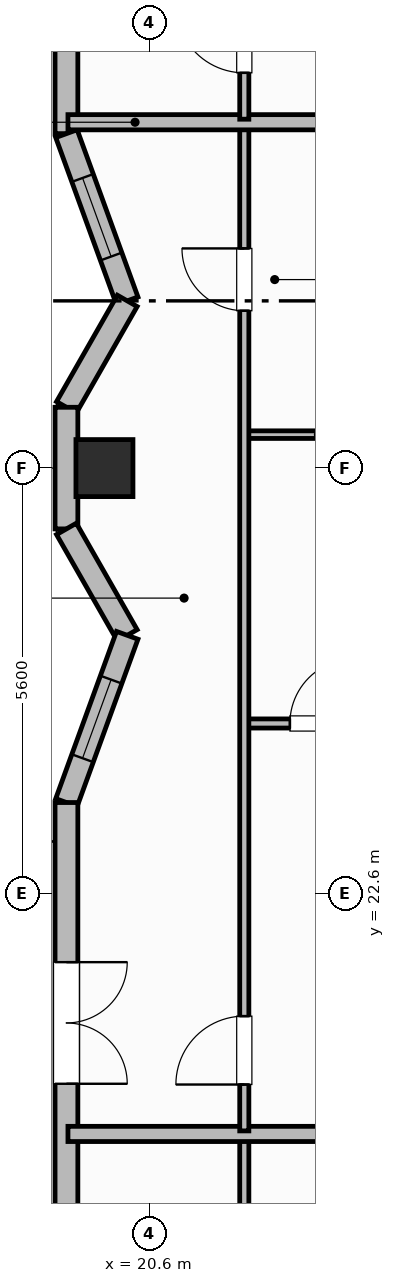
"""IFC4 building model, lengths in metres.
Left out: names, types, materials, properties, quantities, classifications, styles, units other than length and angle.
Written with IfcOpenShell. Run it as: python <this file> out.ifc"""

import sys

from ifc_helpers import new_model, si_unit, direction, frame, frame_2d, origin, origin_2d, place, context, subcontext, project, spatial, rectangle, extrude, element, fill, save


model = new_model("IFC4")
c1 = context("Model", 3, precision=1e-05, world=origin(), true_north=direction((0.0, 1.0)))
c2 = subcontext(c1, "Body", "Model", "MODEL_VIEW")
j1 = project(units=[si_unit("LENGTHUNIT", "METRE"), si_unit("PLANEANGLEUNIT", "RADIAN")], contexts=[c1])
p1 = place(None, origin())
s1 = spatial("IfcSite", under=j1, at=p1, CompositionType="ELEMENT")
p2 = place(p1, origin())
s2 = spatial("IfcBuilding", under=s1, at=p2, CompositionType="ELEMENT")
p3 = place(p2, frame((0.0, 0.0, 267.6)))
s3 = spatial("IfcBuildingStorey", under=s2, at=p3, CompositionType="ELEMENT", Elevation=267.6)
p4 = place(p3, frame((20.01, 28.2, 0.0), z_axis=(0.0, 0.0, 1.0), x_axis=(1.0, 0.0, 0.0)))
e1 = element("IfcColumn", 1, at=p4, inside=s3, PredefinedType="COLUMN", context=c2, shape_type="SweptSolid", body=[
    extrude(rectangle(XDim=0.75, YDim=0.75, at=origin_2d()), origin(), (0.0, 0.0, 1.0), 3.7),
])
p5 = place(p3, frame((19.51, 43.72, 0.0), z_axis=(0.0, 0.0, 1.0), x_axis=(0.0, -1.0, 0.0)))
e2 = element("IfcWall", 2, at=p5, inside=s3, PredefinedType="SOLIDWALL", context=c2, shape_type="SweptSolid", body=[
    extrude(rectangle(XDim=11.12, YDim=0.3, at=frame_2d((5.56, 0.0))), origin(), (0.0, 0.0, 1.0), 2.73),
])
p6 = place(p5, frame((1.137, 0.0, 0.71)))
e3 = element("IfcOpeningElement", 3, at=p6, cuts=e2, PredefinedType="OPENING", context=c2, shape_type="SweptSolid", body=[
    extrude(rectangle(XDim=1.6, YDim=1.9, at=frame_2d((0.8, 0.95))), frame((0.0, 0.16, 0.0), z_axis=(0.0, -1.0, 0.0), x_axis=(1.0, 0.0, 0.0)), (0.0, 0.0, 1.0), 0.32),
])
p7 = place(p5, frame((8.033, 0.0, 0.71)))
e4 = element("IfcOpeningElement", 4, at=p7, cuts=e2, PredefinedType="OPENING", context=c2, shape_type="SweptSolid", body=[
    extrude(rectangle(XDim=1.6, YDim=1.9, at=frame_2d((0.8, 0.95))), frame((0.0, 0.16, 0.0), z_axis=(0.0, -1.0, 0.0), x_axis=(1.0, 0.0, 0.0)), (0.0, 0.0, 1.0), 0.32),
])
p8 = place(p3, frame((19.51, 32.6, 0.0), z_axis=(0.0, 0.0, 1.0), x_axis=(0.341734690003, -0.939796468204, 0.0)))
e5 = element("IfcWall", 5, at=p8, inside=s3, PredefinedType="SOLIDWALL", context=c2, shape_type="SweptSolid", body=[
    extrude(rectangle(XDim=2.341, YDim=0.3, at=frame_2d((1.17, 0.0))), origin(), (0.0, 0.0, 1.0), 2.73),
])
p9 = place(p8, frame((0.621, 0.0, 0.92)))
e6 = element("IfcOpeningElement", 6, at=p9, cuts=e5, PredefinedType="OPENING", context=c2, shape_type="SweptSolid", body=[
    extrude(rectangle(XDim=1.1, YDim=1.65, at=frame_2d((0.55, 0.825))), frame((0.0, 0.16, 0.0), z_axis=(0.0, -1.0, 0.0), x_axis=(1.0, 0.0, 0.0)), (0.0, 0.0, 1.0), 0.32),
])
p10 = place(p3, frame((20.31, 30.4, 0.0), z_axis=(0.0, 0.0, 1.0), x_axis=(-0.496187856351, -0.868215187157, 0.0)))
e7 = element("IfcWall", 7, at=p10, inside=s3, PredefinedType="SOLIDWALL", context=c2, shape_type="SweptSolid", body=[
    extrude(rectangle(XDim=1.612, YDim=0.3, at=frame_2d((0.806, 0.0))), origin(), (0.0, 0.0, 1.0), 2.73),
])
p11 = place(p3, frame((19.51, 29.0, 0.0), z_axis=(0.0, 0.0, 1.0), x_axis=(0.0, -1.0, 0.0)))
e8 = element("IfcWall", 8, at=p11, inside=s3, PredefinedType="SOLIDWALL", context=c2, shape_type="SweptSolid", body=[
    extrude(rectangle(XDim=1.6, YDim=0.3, at=frame_2d((0.8, 0.0))), origin(), (0.0, 0.0, 1.0), 2.73),
])
p12 = place(p3, frame((19.51, 27.4, 0.0), z_axis=(0.0, 0.0, 1.0), x_axis=(0.496187856351, -0.868215187157, 0.0)))
e9 = element("IfcWall", 9, at=p12, inside=s3, PredefinedType="SOLIDWALL", context=c2, shape_type="SweptSolid", body=[
    extrude(rectangle(XDim=1.612, YDim=0.3, at=frame_2d((0.806, 0.0))), origin(), (0.0, 0.0, 1.0), 2.73),
])
p13 = place(p3, frame((20.31, 26.0, 0.0), z_axis=(0.0, 0.0, 1.0), x_axis=(-0.341768184638, -0.939784287999, 0.0)))
e10 = element("IfcWall", 10, at=p13, inside=s3, PredefinedType="SOLIDWALL", context=c2, shape_type="SweptSolid", body=[
    extrude(rectangle(XDim=2.341, YDim=0.3, at=frame_2d((1.17, 0.0))), origin(), (0.0, 0.0, 1.0), 2.73),
])
p14 = place(p13, frame((0.621, 0.0, 0.92)))
e11 = element("IfcOpeningElement", 11, at=p14, cuts=e10, PredefinedType="OPENING", context=c2, shape_type="SweptSolid", body=[
    extrude(rectangle(XDim=1.1, YDim=1.65, at=frame_2d((0.55, 0.825))), frame((0.0, 0.16, 0.0), z_axis=(0.0, -1.0, 0.0), x_axis=(1.0, 0.0, 0.0)), (0.0, 0.0, 1.0), 0.32),
])
p15 = place(p3, frame((19.51, 23.8, 0.0), z_axis=(0.0, 0.0, 1.0), x_axis=(0.0, -1.0, 0.0)))
e12 = element("IfcWall", 12, at=p15, inside=s3, PredefinedType="SOLIDWALL", context=c2, shape_type="SweptSolid", body=[
    extrude(rectangle(XDim=11.12, YDim=0.3, at=frame_2d((5.56, 0.0))), origin(), (0.0, 0.0, 1.0), 2.73),
])
p16 = place(p15, frame((2.1, 0.0, 0.0)))
e13 = element("IfcOpeningElement", 13, at=p16, cuts=e12, PredefinedType="OPENING", context=c2, shape_type="SweptSolid", body=[
    extrude(rectangle(XDim=1.6, YDim=2.1, at=frame_2d((0.8, 1.05))), frame((0.0, 0.16, 0.0), z_axis=(0.0, -1.0, 0.0), x_axis=(1.0, 0.0, 0.0)), (0.0, 0.0, 1.0), 0.32),
])
p17 = place(p15, frame((8.483, 0.0, 0.76)))
e14 = element("IfcOpeningElement", 14, at=p17, cuts=e12, PredefinedType="OPENING", context=c2, shape_type="SweptSolid", body=[
    extrude(rectangle(XDim=1.4, YDim=1.85, at=frame_2d((0.7, 0.925))), frame((0.0, 0.16, 0.0), z_axis=(0.0, -1.0, 0.0), x_axis=(1.0, 0.0, 0.0)), (0.0, 0.0, 1.0), 0.32),
])
p18 = place(p3, frame((21.85, 9.99, 0.0), z_axis=(0.0, 0.0, 1.0), x_axis=(0.0, 1.0, 0.0)))
e15 = element("IfcWall", 15, at=p18, inside=s3, PredefinedType="PARTITIONING", context=c2, shape_type="SweptSolid", body=[
    extrude(rectangle(XDim=9.41, YDim=0.12, at=frame_2d((4.705, 0.0))), origin(), (0.0, 0.0, 1.0), 2.56),
])
p19 = place(p18, frame((0.41, 0.0, 0.0)))
e16 = element("IfcOpeningElement", 16, at=p19, cuts=e15, PredefinedType="OPENING", context=c2, shape_type="SweptSolid", body=[
    extrude(rectangle(XDim=0.9, YDim=2.1, at=frame_2d((0.45, 1.05))), frame((0.0, 0.07, 0.0), z_axis=(0.0, -1.0, 0.0), x_axis=(1.0, 0.0, 0.0)), (0.0, 0.0, 1.0), 0.14),
])
p20 = place(p3, frame((19.53, 19.44, 0.0), z_axis=(0.0, 0.0, 1.0), x_axis=(1.0, 0.0, 0.0)))
e17 = element("IfcWall", 17, at=p20, inside=s3, PredefinedType="PARTITIONING", context=c2, shape_type="SweptSolid", body=[
    extrude(rectangle(XDim=4.27, YDim=0.2, at=frame_2d((2.135, 0.0))), origin(), (0.0, 0.0, 1.0), 2.56),
])
p21 = place(p3, frame((21.85, 24.84, 0.0), z_axis=(0.0, 0.0, 1.0), x_axis=(1.0, 0.0, 0.0)))
e18 = element("IfcWall", 18, at=p21, inside=s3, PredefinedType="PARTITIONING", context=c2, shape_type="SweptSolid", body=[
    extrude(rectangle(XDim=1.95, YDim=0.12, at=frame_2d((0.975, 0.0))), origin(), (0.0, 0.0, 1.0), 2.56),
])
p22 = place(p21, frame((0.6, 0.0, 0.0)))
e19 = element("IfcOpeningElement", 19, at=p22, cuts=e18, PredefinedType="OPENING", context=c2, shape_type="SweptSolid", body=[
    extrude(rectangle(XDim=0.85, YDim=2.1, at=frame_2d((0.425, 1.05))), frame((0.0, 0.07, 0.0), z_axis=(0.0, -1.0, 0.0), x_axis=(1.0, 0.0, 0.0)), (0.0, 0.0, 1.0), 0.14),
])
p23 = place(p3, frame((21.85, 28.64, 0.0), z_axis=(0.0, 0.0, 1.0), x_axis=(1.0, 0.0, 0.0)))
e20 = element("IfcWall", 20, at=p23, inside=s3, PredefinedType="PARTITIONING", context=c2, shape_type="SweptSolid", body=[
    extrude(rectangle(XDim=1.95, YDim=0.1, at=frame_2d((0.975, 0.0))), origin(), (0.0, 0.0, 1.0), 2.56),
])
p24 = place(p3, frame((21.85, 19.48, 0.0), z_axis=(0.0, 0.0, 1.0), x_axis=(0.0, 1.0, 0.0)))
e21 = element("IfcWall", 21, at=p24, inside=s3, PredefinedType="PARTITIONING", context=c2, shape_type="SweptSolid", body=[
    extrude(rectangle(XDim=13.23, YDim=0.12, at=frame_2d((6.615, 0.0))), origin(), (0.0, 0.0, 1.0), 2.56),
])
p25 = place(p24, frame((0.61, 0.0, 0.0)))
e22 = element("IfcOpeningElement", 22, at=p25, cuts=e21, PredefinedType="OPENING", context=c2, shape_type="SweptSolid", body=[
    extrude(rectangle(XDim=0.9, YDim=2.1, at=frame_2d((0.45, 1.05))), frame((0.0, 0.07, 0.0), z_axis=(0.0, -1.0, 0.0), x_axis=(1.0, 0.0, 0.0)), (0.0, 0.0, 1.0), 0.14),
])
p26 = place(p24, frame((10.79, 0.0, 0.0)))
e23 = element("IfcOpeningElement", 23, at=p26, cuts=e21, PredefinedType="OPENING", context=c2, shape_type="SweptSolid", body=[
    extrude(rectangle(XDim=0.82, YDim=2.08, at=frame_2d((0.41, 1.04))), frame((0.0, 0.07, 0.0), z_axis=(0.0, -1.0, 0.0), x_axis=(1.0, 0.0, 0.0)), (0.0, 0.0, 1.0), 0.14),
])
p27 = place(p3, frame((19.53, 32.75, 0.0), z_axis=(0.0, 0.0, 1.0), x_axis=(1.0, 0.0, 0.0)))
e24 = element("IfcWall", 24, at=p27, inside=s3, PredefinedType="PARTITIONING", context=c2, shape_type="SweptSolid", body=[
    extrude(rectangle(XDim=4.27, YDim=0.2, at=frame_2d((2.135, 0.0))), origin(), (0.0, 0.0, 1.0), 2.56),
])
p28 = place(p3, frame((21.85, 32.79, 0.0), z_axis=(0.0, 0.0, 1.0), x_axis=(0.0, 1.0, 0.0)))
e25 = element("IfcWall", 25, at=p28, inside=s3, PredefinedType="PARTITIONING", context=c2, shape_type="SweptSolid", body=[
    extrude(rectangle(XDim=5.42, YDim=0.12, at=frame_2d((2.71, 0.0))), origin(), (0.0, 0.0, 1.0), 2.56),
])
p29 = place(p28, frame((0.61, 0.0, 0.0)))
e26 = element("IfcOpeningElement", 26, at=p29, cuts=e25, PredefinedType="OPENING", context=c2, shape_type="SweptSolid", body=[
    extrude(rectangle(XDim=0.9, YDim=2.1, at=frame_2d((0.45, 1.05))), frame((0.0, 0.07, 0.0), z_axis=(0.0, -1.0, 0.0), x_axis=(1.0, 0.0, 0.0)), (0.0, 0.0, 1.0), 0.14),
])
p30 = place(p9, origin())
e27 = element("IfcWindow", 27, at=p30, inside=s3, PartitioningType="SINGLE_PANEL", PredefinedType="WINDOW", context=c2, shape_type="SweptSolid", body=[
    extrude(rectangle(XDim=1.1, YDim=1.65, at=frame_2d((0.55, 0.825))), frame((0.0, 0.03, 0.0), z_axis=(0.0, -1.0, 0.0), x_axis=(1.0, 0.0, 0.0)), (0.0, 0.0, 1.0), 0.06),
])
fill(e6, e27)
p31 = place(p14, origin())
e28 = element("IfcWindow", 28, at=p31, inside=s3, PartitioningType="SINGLE_PANEL", PredefinedType="WINDOW", context=c2, shape_type="SweptSolid", body=[
    extrude(rectangle(XDim=1.1, YDim=1.65, at=frame_2d((0.55, 0.825))), frame((0.0, 0.03, 0.0), z_axis=(0.0, -1.0, 0.0), x_axis=(1.0, 0.0, 0.0)), (0.0, 0.0, 1.0), 0.06),
])
fill(e11, e28)
p32 = place(p16, origin())
e29 = element("IfcDoor", 29, at=p32, inside=s3, OperationType="DOUBLE_DOOR_SINGLE_SWING", PredefinedType="DOOR", context=c2, shape_type="SweptSolid", body=[
    extrude(rectangle(XDim=1.6, YDim=2.1, at=frame_2d((0.8, 1.05))), frame((0.0, 0.025, 0.0), z_axis=(0.0, -1.0, 0.0), x_axis=(1.0, 0.0, 0.0)), (0.0, 0.0, 1.0), 0.05),
])
fill(e13, e29)
p33 = place(p22, origin())
e30 = element("IfcDoor", 30, at=p33, inside=s3, OperationType="SINGLE_SWING_RIGHT", PredefinedType="DOOR", context=c2, shape_type="SweptSolid", body=[
    extrude(rectangle(XDim=0.85, YDim=2.1, at=frame_2d((0.425, 1.05))), frame((0.0, 0.025, 0.0), z_axis=(0.0, -1.0, 0.0), x_axis=(1.0, 0.0, 0.0)), (0.0, 0.0, 1.0), 0.05),
])
fill(e19, e30)
p34 = place(p25, origin())
e31 = element("IfcDoor", 31, at=p34, inside=s3, OperationType="SINGLE_SWING_LEFT", PredefinedType="DOOR", context=c2, shape_type="SweptSolid", body=[
    extrude(rectangle(XDim=0.9, YDim=2.1, at=frame_2d((0.45, 1.05))), frame((0.0, 0.025, 0.0), z_axis=(0.0, -1.0, 0.0), x_axis=(1.0, 0.0, 0.0)), (0.0, 0.0, 1.0), 0.05),
])
fill(e22, e31)
p35 = place(p26, origin())
e32 = element("IfcDoor", 32, at=p35, inside=s3, OperationType="SINGLE_SWING_RIGHT", PredefinedType="DOOR", context=c2, shape_type="SweptSolid", body=[
    extrude(rectangle(XDim=0.82, YDim=2.08, at=frame_2d((0.41, 1.04))), frame((0.0, 0.025, 0.0), z_axis=(0.0, -1.0, 0.0), x_axis=(1.0, 0.0, 0.0)), (0.0, 0.0, 1.0), 0.05),
])
fill(e23, e32)
p36 = place(p29, origin())
e33 = element("IfcDoor", 33, at=p36, inside=s3, OperationType="SINGLE_SWING_RIGHT", PredefinedType="DOOR", context=c2, shape_type="SweptSolid", body=[
    extrude(rectangle(XDim=0.9, YDim=2.1, at=frame_2d((0.45, 1.05))), frame((0.0, 0.025, 0.0), z_axis=(0.0, -1.0, 0.0), x_axis=(1.0, 0.0, 0.0)), (0.0, 0.0, 1.0), 0.05),
])
fill(e26, e33)
save(model, sys.argv[1])
